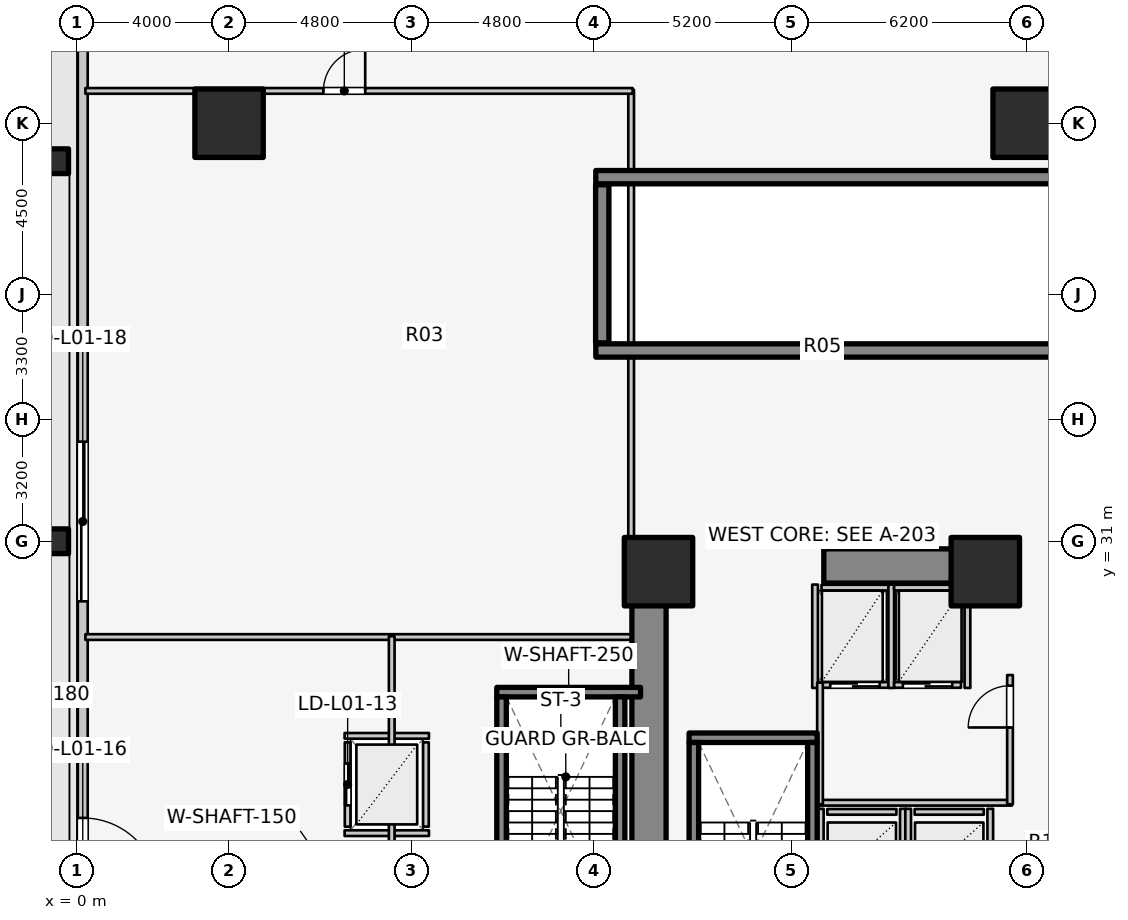
"""IFC4 building model, lengths in metres.
Left out: names, types, materials, properties, quantities, classifications, styles, units other than length and angle.
Written with IfcOpenShell. Run it as: python <this file> out.ifc"""

import sys

from ifc_helpers import new_model, si_unit, direction, frame, frame_2d, origin, origin_2d, place, context, subcontext, project, spatial, rectangle, extrude, element, fill, save


model = new_model("IFC4")
c1 = context("Model", 3, precision=1e-05, world=origin(), true_north=direction((0.0, 1.0)))
c2 = subcontext(c1, "Body", "Model", "MODEL_VIEW")
j1 = project(units=[si_unit("LENGTHUNIT", "METRE"), si_unit("PLANEANGLEUNIT", "RADIAN")], contexts=[c1])
p1 = place(None, origin())
s1 = spatial("IfcSite", under=j1, at=p1, CompositionType="ELEMENT")
p2 = place(p1, origin())
s2 = spatial("IfcBuilding", under=s1, at=p2, CompositionType="ELEMENT")
p3 = place(p2, origin())
s3 = spatial("IfcBuildingStorey", under=s2, at=p3, CompositionType="ELEMENT", Elevation=0.0)
p4 = place(p3, frame((15.05, 17.05, 0.0), z_axis=(0.0, 0.0, 1.0), x_axis=(0.0, 1.0, 0.0)))
e1 = element("IfcWall", 1, at=p4, inside=s3, PredefinedType="SHEAR", context=c2, shape_type="SweptSolid", body=[
    extrude(rectangle(XDim=12.8, YDim=0.9, at=frame_2d((6.4, 0.0))), origin(), (0.0, 0.0, 1.0), 4.6),
])
p5 = place(p3, frame((19.65, 30.35, 0.0), z_axis=(0.0, 0.0, 1.0), x_axis=(1.0, 0.0, 0.0)))
e2 = element("IfcWall", 2, at=p5, inside=s3, PredefinedType="SHEAR", context=c2, shape_type="SweptSolid", body=[
    extrude(rectangle(XDim=4.5, YDim=0.9, at=frame_2d((2.25, 0.0))), origin(), (0.0, 0.0, 1.0), 4.6),
])
p6 = place(p3, frame((16.105, 25.83, 0.0), z_axis=(0.0, 0.0, 1.0), x_axis=(1.0, 0.0, 0.0)))
e3 = element("IfcWall", 3, at=p6, inside=s3, PredefinedType="SOLIDWALL", context=c2, shape_type="SweptSolid", body=[
    extrude(rectangle(XDim=3.37, YDim=0.25, at=frame_2d((1.685, 0.0))), origin(), (0.0, 0.0, 1.0), 4.6),
])
for number, where, z_axis, x_axis in (
    (4, (16.23, 17.895, 0.0), (0.0, 0.0, 1.0), (0.0, 1.0, 0.0)),
    (5, (19.35, 17.895, 0.0), (0.0, 0.0, 1.0), (0.0, 1.0, 0.0)),
):
    element("IfcWall", number, at=place(p3, frame(where, z_axis=z_axis, x_axis=x_axis)), inside=s3, PredefinedType="SOLIDWALL", context=c2, shape_type="SweptSolid", body=[
        extrude(rectangle(XDim=7.81, YDim=0.25, at=frame_2d((3.905, 0.0))), origin(), (0.0, 0.0, 1.0), 4.6),
    ])
p7 = place(p3, frame((11.045, 27.03, 0.0), z_axis=(0.0, 0.0, 1.0), x_axis=(1.0, 0.0, 0.0)))
e6 = element("IfcWall", 6, at=p7, inside=s3, PredefinedType="SOLIDWALL", context=c2, shape_type="SweptSolid", body=[
    extrude(rectangle(XDim=3.782, YDim=0.25, at=frame_2d((1.891, 0.0))), origin(), (0.0, 0.0, 1.0), 4.6),
])
for number, where, z_axis, x_axis in (
    (7, (11.17, 19.095, 0.0), (0.0, 0.0, 1.0), (0.0, 1.0, 0.0)),
    (8, (14.29, 19.095, 0.0), (0.0, 0.0, 1.0), (0.0, 1.0, 0.0)),
):
    element("IfcWall", number, at=place(p3, frame(where, z_axis=z_axis, x_axis=x_axis)), inside=s3, PredefinedType="SOLIDWALL", context=c2, shape_type="SweptSolid", body=[
        extrude(rectangle(XDim=7.81, YDim=0.25, at=frame_2d((3.905, 0.0))), origin(), (0.0, 0.0, 1.0), 4.6),
    ])
for number, where, z_axis, x_axis in (
    (9, (13.65, 36.02, 0.0), (0.0, 0.0, 1.0), (1.0, 0.0, 0.0)),
    (10, (13.65, 40.58, 0.0), (0.0, 0.0, 1.0), (1.0, 0.0, 0.0)),
):
    element("IfcWall", number, at=place(p3, frame(where, z_axis=z_axis, x_axis=x_axis)), inside=s3, PredefinedType="SOLIDWALL", context=c2, shape_type="SweptSolid", body=[
        extrude(rectangle(XDim=44.53, YDim=0.35, at=frame_2d((22.265, 0.0))), origin(), (0.0, 0.0, 1.0), 4.6),
    ])
p8 = place(p3, frame((13.82, 36.22, 0.0), z_axis=(0.0, 0.0, 1.0), x_axis=(0.0, 1.0, 0.0)))
e11 = element("IfcWall", 11, at=p8, inside=s3, PredefinedType="SOLIDWALL", context=c2, shape_type="SweptSolid", body=[
    extrude(rectangle(XDim=4.16, YDim=0.35, at=frame_2d((2.08, 0.0))), origin(), (0.0, 0.0, 1.0), 4.6),
])
for number, where, z_axis, x_axis in (
    (12, (-0.55, 31.0, 0.0), (0.0, 0.0, 1.0), (1.0, 0.0, 0.0)),
    (13, (-0.55, 41.0, 0.0), (0.0, 0.0, 1.0), (1.0, 0.0, 0.0)),
):
    element("IfcColumn", number, at=place(p3, frame(where, z_axis=z_axis, x_axis=x_axis)), inside=s3, PredefinedType="PILASTER", context=c2, shape_type="SweptSolid", body=[
        extrude(rectangle(XDim=0.65, YDim=0.65, at=origin_2d()), origin(), (0.0, 0.0, 1.0), 4.04),
    ])
for number, where, z_axis, x_axis in (
    (14, (23.9, 30.2, 0.0), (0.0, 0.0, 1.0), (1.0, 0.0, 0.0)),
    (15, (15.3, 30.2, 0.0), (0.0, 0.0, 1.0), (1.0, 0.0, 0.0)),
    (16, (25.0, 42.0, 0.0), (0.0, 0.0, 1.0), (1.0, 0.0, 0.0)),
    (17, (4.0, 42.0, 0.0), (0.0, 0.0, 1.0), (1.0, 0.0, 0.0)),
):
    element("IfcColumn", number, at=place(p3, frame(where, z_axis=z_axis, x_axis=x_axis)), inside=s3, PredefinedType="COLUMN", context=c2, shape_type="SweptSolid", body=[
        extrude(rectangle(XDim=1.8, YDim=1.8, at=origin_2d()), origin(), (0.0, 0.0, 1.0), 4.6),
    ])
p9 = place(p3, frame((0.15, 45.72, 0.0), z_axis=(0.0, 0.0, 1.0), x_axis=(0.0, -1.0, 0.0)))
e18 = element("IfcWall", 18, at=p9, inside=s3, PredefinedType="STANDARD", context=c2, shape_type="SweptSolid", body=[
    extrude(rectangle(XDim=45.44, YDim=0.26, at=frame_2d((22.72, 0.0))), origin(), (0.0, 0.0, 1.0), 4.28),
])
p10 = place(p9, frame((29.8, 0.0, 0.0)))
e19 = element("IfcOpeningElement", 19, at=p10, cuts=e18, PredefinedType="OPENING", context=c2, shape_type="SweptSolid", body=[
    extrude(rectangle(XDim=2.0, YDim=2.4, at=frame_2d((1.0, 1.2))), frame((0.0, 0.14, 0.0), z_axis=(0.0, -1.0, 0.0), x_axis=(1.0, 0.0, 0.0)), (0.0, 0.0, 1.0), 0.28),
])
p11 = place(p9, frame((22.0, 0.0, 0.0)))
e20 = element("IfcOpeningElement", 20, at=p11, cuts=e18, PredefinedType="OPENING", context=c2, shape_type="SweptSolid", body=[
    extrude(rectangle(XDim=2.0, YDim=2.4, at=frame_2d((1.0, 1.2))), frame((0.0, 0.14, 0.0), z_axis=(0.0, -1.0, 0.0), x_axis=(1.0, 0.0, 0.0)), (0.0, 0.0, 1.0), 0.28),
])
p12 = place(p9, frame((36.5, 0.0, 0.0)))
e21 = element("IfcOpeningElement", 21, at=p12, cuts=e18, PredefinedType="OPENING", context=c2, shape_type="SweptSolid", body=[
    extrude(rectangle(XDim=2.0, YDim=2.4, at=frame_2d((1.0, 1.2))), frame((0.0, 0.14, 0.0), z_axis=(0.0, -1.0, 0.0), x_axis=(1.0, 0.0, 0.0)), (0.0, 0.0, 1.0), 0.28),
])
p13 = place(p9, frame((12.1, 0.0, 0.0)))
e22 = element("IfcOpeningElement", 22, at=p13, cuts=e18, PredefinedType="OPENING", context=c2, shape_type="SweptSolid", body=[
    extrude(rectangle(XDim=4.2, YDim=3.0, at=frame_2d((2.1, 1.5))), frame((0.0, 0.14, 0.0), z_axis=(0.0, -1.0, 0.0), x_axis=(1.0, 0.0, 0.0)), (0.0, 0.0, 1.0), 0.28),
])
p14 = place(p3, frame((19.74, 23.88, 0.0), z_axis=(0.0, 0.0, 1.0), x_axis=(1.0, 0.0, 0.0)))
e23 = element("IfcWall", 23, at=p14, inside=s3, PredefinedType="SOLIDWALL", context=c2, shape_type="SweptSolid", body=[
    extrude(rectangle(XDim=1.82, YDim=0.15, at=frame_2d((0.91, 0.0))), origin(), (0.0, 0.0, 1.0), 4.255),
])
for number, where, z_axis, x_axis in (
    (24, (19.57, 21.64, 0.0), (0.0, 0.0, 1.0), (0.0, 1.0, 0.0)),
    (25, (21.73, 21.64, 0.0), (0.0, 0.0, 1.0), (0.0, 1.0, 0.0)),
):
    element("IfcWall", number, at=place(p3, frame(where, z_axis=z_axis, x_axis=x_axis)), inside=s3, PredefinedType="SOLIDWALL", context=c2, shape_type="SweptSolid", body=[
        extrude(rectangle(XDim=2.32, YDim=0.15, at=frame_2d((1.16, 0.0))), origin(), (0.0, 0.0, 1.0), 4.255),
    ])
p15 = place(p3, frame((22.04, 23.88, 0.0), z_axis=(0.0, 0.0, 1.0), x_axis=(1.0, 0.0, 0.0)))
e26 = element("IfcWall", 26, at=p15, inside=s3, PredefinedType="SOLIDWALL", context=c2, shape_type="SweptSolid", body=[
    extrude(rectangle(XDim=1.82, YDim=0.15, at=frame_2d((0.91, 0.0))), origin(), (0.0, 0.0, 1.0), 3.62),
])
p16 = place(p3, frame((21.87, 21.64, 0.0), z_axis=(0.0, 0.0, 1.0), x_axis=(0.0, 1.0, 0.0)))
e27 = element("IfcWall", 27, at=p16, inside=s3, PredefinedType="SOLIDWALL", context=c2, shape_type="SweptSolid", body=[
    extrude(rectangle(XDim=2.32, YDim=0.15, at=frame_2d((1.16, 0.0))), origin(), (0.0, 0.0, 1.0), 4.255),
])
p17 = place(p3, frame((24.03, 21.64, 0.0), z_axis=(0.0, 0.0, 1.0), x_axis=(0.0, 1.0, 0.0)))
e28 = element("IfcWall", 28, at=p17, inside=s3, PredefinedType="SOLIDWALL", context=c2, shape_type="SweptSolid", body=[
    extrude(rectangle(XDim=2.32, YDim=0.15, at=frame_2d((1.16, 0.0))), origin(), (0.0, 0.0, 1.0), 3.62),
])
p18 = place(p3, frame((19.59, 27.22, 0.0), z_axis=(0.0, 0.0, 1.0), x_axis=(1.0, 0.0, 0.0)))
e29 = element("IfcWall", 29, at=p18, inside=s3, PredefinedType="SOLIDWALL", context=c2, shape_type="SweptSolid", body=[
    extrude(rectangle(XDim=1.76, YDim=0.15, at=frame_2d((0.88, 0.0))), origin(), (0.0, 0.0, 1.0), 4.255),
])
p19 = place(p18, frame((0.23, 0.0, 0.0)))
e30 = element("IfcOpeningElement", 30, at=p19, cuts=e29, PredefinedType="OPENING", context=c2, shape_type="SweptSolid", body=[
    extrude(rectangle(XDim=1.3, YDim=2.1, at=frame_2d((0.65, 1.05))), frame((0.0, 0.085, 0.0), z_axis=(0.0, -1.0, 0.0), x_axis=(1.0, 0.0, 0.0)), (0.0, 0.0, 1.0), 0.17),
])
p20 = place(p3, frame((19.59, 29.78, 0.0), z_axis=(0.0, 0.0, 1.0), x_axis=(1.0, 0.0, 0.0)))
e31 = element("IfcWall", 31, at=p20, inside=s3, PredefinedType="SOLIDWALL", context=c2, shape_type="SweptSolid", body=[
    extrude(rectangle(XDim=1.76, YDim=0.15, at=frame_2d((0.88, 0.0))), origin(), (0.0, 0.0, 1.0), 4.255),
])
for number, where, z_axis, x_axis in (
    (32, (19.42, 27.14, 0.0), (0.0, 0.0, 1.0), (0.0, 1.0, 0.0)),
    (33, (21.425, 27.14, 0.0), (0.0, 0.0, 1.0), (0.0, 1.0, 0.0)),
):
    element("IfcWall", number, at=place(p3, frame(where, z_axis=z_axis, x_axis=x_axis)), inside=s3, PredefinedType="SOLIDWALL", context=c2, shape_type="SweptSolid", body=[
        extrude(rectangle(XDim=2.72, YDim=0.15, at=frame_2d((1.36, 0.0))), origin(), (0.0, 0.0, 1.0), 4.255),
    ])
p21 = place(p3, frame((21.5, 27.22, 0.0), z_axis=(0.0, 0.0, 1.0), x_axis=(1.0, 0.0, 0.0)))
e34 = element("IfcWall", 34, at=p21, inside=s3, PredefinedType="SOLIDWALL", context=c2, shape_type="SweptSolid", body=[
    extrude(rectangle(XDim=1.76, YDim=0.15, at=frame_2d((0.88, 0.0))), origin(), (0.0, 0.0, 1.0), 4.255),
])
p22 = place(p21, frame((0.23, 0.0, 0.0)))
e35 = element("IfcOpeningElement", 35, at=p22, cuts=e34, PredefinedType="OPENING", context=c2, shape_type="SweptSolid", body=[
    extrude(rectangle(XDim=1.3, YDim=2.1, at=frame_2d((0.65, 1.05))), frame((0.0, 0.085, 0.0), z_axis=(0.0, -1.0, 0.0), x_axis=(1.0, 0.0, 0.0)), (0.0, 0.0, 1.0), 0.17),
])
p23 = place(p3, frame((21.5, 29.78, 0.0), z_axis=(0.0, 0.0, 1.0), x_axis=(1.0, 0.0, 0.0)))
e36 = element("IfcWall", 36, at=p23, inside=s3, PredefinedType="SOLIDWALL", context=c2, shape_type="SweptSolid", body=[
    extrude(rectangle(XDim=1.76, YDim=0.15, at=frame_2d((0.88, 0.0))), origin(), (0.0, 0.0, 1.0), 4.255),
])
p24 = place(p3, frame((23.43, 27.14, 0.0), z_axis=(0.0, 0.0, 1.0), x_axis=(0.0, 1.0, 0.0)))
e37 = element("IfcWall", 37, at=p24, inside=s3, PredefinedType="SOLIDWALL", context=c2, shape_type="SweptSolid", body=[
    extrude(rectangle(XDim=2.72, YDim=0.15, at=frame_2d((1.36, 0.0))), origin(), (0.0, 0.0, 1.0), 4.255),
])
p25 = place(p3, frame((7.12, 23.49, 0.0), z_axis=(0.0, 0.0, 1.0), x_axis=(0.0, 1.0, 0.0)))
e38 = element("IfcWall", 38, at=p25, inside=s3, PredefinedType="SOLIDWALL", context=c2, shape_type="SweptSolid", body=[
    extrude(rectangle(XDim=2.22, YDim=0.15, at=frame_2d((1.11, 0.0))), origin(), (0.0, 0.0, 1.0), 4.255),
])
p26 = place(p25, frame((0.56, 0.0, 0.0)))
e39 = element("IfcOpeningElement", 39, at=p26, cuts=e38, PredefinedType="OPENING", context=c2, shape_type="SweptSolid", body=[
    extrude(rectangle(XDim=1.1, YDim=2.1, at=frame_2d((0.55, 1.05))), frame((0.0, 0.085, 0.0), z_axis=(0.0, -1.0, 0.0), x_axis=(1.0, 0.0, 0.0)), (0.0, 0.0, 1.0), 0.17),
])
for number, where, z_axis, x_axis in (
    (40, (9.18, 23.49, 0.0), (0.0, 0.0, 1.0), (0.0, 1.0, 0.0)),
    (41, (7.04, 23.32, 0.0), (0.0, 0.0, 1.0), (1.0, 0.0, 0.0)),
    (42, (7.04, 25.88, 0.0), (0.0, 0.0, 1.0), (1.0, 0.0, 0.0)),
):
    element("IfcWall", number, at=place(p3, frame(where, z_axis=z_axis, x_axis=x_axis)), inside=s3, PredefinedType="SOLIDWALL", context=c2, shape_type="SweptSolid", body=[
        extrude(rectangle(XDim=2.22, YDim=0.15, at=frame_2d((1.11, 0.0))), origin(), (0.0, 0.0, 1.0), 4.255),
    ])
p27 = place(p3, frame((19.52, 24.12, 0.0), z_axis=(0.0, 0.0, 1.0), x_axis=(1.0, 0.0, 0.0)))
e43 = element("IfcWall", 43, at=p27, inside=s3, PredefinedType="PARTITIONING", context=c2, shape_type="SweptSolid", body=[
    extrude(rectangle(XDim=5.08, YDim=0.15, at=frame_2d((2.54, 0.0))), origin(), (0.0, 0.0, 1.0), 3.62),
])
p28 = place(p3, frame((19.55, 24.08, 0.0), z_axis=(0.0, 0.0, 1.0), x_axis=(0.0, 1.0, 0.0)))
e44 = element("IfcWall", 44, at=p28, inside=s3, PredefinedType="PARTITIONING", context=c2, shape_type="SweptSolid", body=[
    extrude(rectangle(XDim=3.2, YDim=0.15, at=frame_2d((1.6, 0.0))), origin(), (0.0, 0.0, 1.0), 4.255),
])
p29 = place(p3, frame((24.55, 24.08, 0.0), z_axis=(0.0, 0.0, 1.0), x_axis=(0.0, 1.0, 0.0)))
e45 = element("IfcWall", 45, at=p29, inside=s3, PredefinedType="PARTITIONING", context=c2, shape_type="SweptSolid", body=[
    extrude(rectangle(XDim=3.4, YDim=0.15, at=frame_2d((1.7, 0.0))), origin(), (0.0, 0.0, 1.0), 4.255),
])
p30 = place(p29, frame((2.02, 0.0, 0.0)))
e46 = element("IfcOpeningElement", 46, at=p30, cuts=e45, PredefinedType="OPENING", context=c2, shape_type="SweptSolid", body=[
    extrude(rectangle(XDim=1.1, YDim=2.1, at=frame_2d((0.55, 1.05))), frame((0.0, 0.085, 0.0), z_axis=(0.0, -1.0, 0.0), x_axis=(1.0, 0.0, 0.0)), (0.0, 0.0, 1.0), 0.17),
])
p31 = place(p3, frame((0.22, 28.48, 0.0), z_axis=(0.0, 0.0, 1.0), x_axis=(1.0, 0.0, 0.0)))
e47 = element("IfcWall", 47, at=p31, inside=s3, PredefinedType="PARTITIONING", context=c2, shape_type="SweptSolid", body=[
    extrude(rectangle(XDim=14.4, YDim=0.15, at=frame_2d((7.2, 0.0))), origin(), (0.0, 0.0, 1.0), 3.3),
])
p32 = place(p3, frame((8.28, 16.3, 0.0), z_axis=(0.0, 0.0, 1.0), x_axis=(0.0, 1.0, 0.0)))
e48 = element("IfcWall", 48, at=p32, inside=s3, PredefinedType="PARTITIONING", context=c2, shape_type="SweptSolid", body=[
    extrude(rectangle(XDim=12.2, YDim=0.15, at=frame_2d((6.1, 0.0))), origin(), (0.0, 0.0, 1.0), 4.255),
])
p33 = place(p3, frame((14.58, 29.86, 0.0), z_axis=(0.0, 0.0, 1.0), x_axis=(0.0, 1.0, 0.0)))
e49 = element("IfcWall", 49, at=p33, inside=s3, PredefinedType="PARTITIONING", context=c2, shape_type="SweptSolid", body=[
    extrude(rectangle(XDim=13.02, YDim=0.15, at=frame_2d((6.51, 0.0))), origin(), (0.0, 0.0, 1.0), 3.3),
])
p34 = place(p3, frame((0.22, 42.85, 0.0), z_axis=(0.0, 0.0, 1.0), x_axis=(1.0, 0.0, 0.0)))
e50 = element("IfcWall", 50, at=p34, inside=s3, PredefinedType="PARTITIONING", context=c2, shape_type="SweptSolid", body=[
    extrude(rectangle(XDim=14.4, YDim=0.15, at=frame_2d((7.2, 0.0))), origin(), (0.0, 0.0, 1.0), 4.255),
])
p35 = place(p34, frame((6.262, 0.0, 0.0)))
e51 = element("IfcOpeningElement", 51, at=p35, cuts=e50, PredefinedType="OPENING", context=c2, shape_type="SweptSolid", body=[
    extrude(rectangle(XDim=1.1, YDim=2.1, at=frame_2d((0.55, 1.05))), frame((0.0, 0.085, 0.0), z_axis=(0.0, -1.0, 0.0), x_axis=(1.0, 0.0, 0.0)), (0.0, 0.0, 1.0), 0.17),
])
p36 = place(p11, frame((2.0, 0.0, 0.0), z_axis=(0.0, 0.0, 1.0), x_axis=(-1.0, 0.0, 0.0)))
e52 = element("IfcDoor", 52, at=p36, inside=s3, OperationType="SINGLE_SWING_RIGHT", PredefinedType="DOOR", context=c2, shape_type="SweptSolid", body=[
    extrude(rectangle(XDim=2.0, YDim=2.4, at=frame_2d((1.0, 1.2))), frame((0.0, 0.025, 0.0), z_axis=(0.0, -1.0, 0.0), x_axis=(1.0, 0.0, 0.0)), (0.0, 0.0, 1.0), 0.05),
])
fill(e20, e52)
p37 = place(p13, origin())
e53 = element("IfcDoor", 53, at=p37, inside=s3, OperationType="SLIDING_TO_LEFT", PredefinedType="GATE", context=c2, shape_type="SweptSolid", body=[
    extrude(rectangle(XDim=4.2, YDim=3.0, at=frame_2d((2.1, 1.5))), frame((0.0, 0.025, 0.0), z_axis=(0.0, -1.0, 0.0), x_axis=(1.0, 0.0, 0.0)), (0.0, 0.0, 1.0), 0.05),
])
fill(e22, e53)
p38 = place(p19, origin())
e54 = element("IfcDoor", 54, at=p38, inside=s3, OperationType="DOUBLE_DOOR_SLIDING", PredefinedType="DOOR", context=c2, shape_type="SweptSolid", body=[
    extrude(rectangle(XDim=1.3, YDim=2.1, at=frame_2d((0.65, 1.05))), frame((0.0, 0.025, 0.0), z_axis=(0.0, -1.0, 0.0), x_axis=(1.0, 0.0, 0.0)), (0.0, 0.0, 1.0), 0.05),
])
fill(e30, e54)
p39 = place(p22, origin())
e55 = element("IfcDoor", 55, at=p39, inside=s3, OperationType="DOUBLE_DOOR_SLIDING", PredefinedType="DOOR", context=c2, shape_type="SweptSolid", body=[
    extrude(rectangle(XDim=1.3, YDim=2.1, at=frame_2d((0.65, 1.05))), frame((0.0, 0.025, 0.0), z_axis=(0.0, -1.0, 0.0), x_axis=(1.0, 0.0, 0.0)), (0.0, 0.0, 1.0), 0.05),
])
fill(e35, e55)
p40 = place(p26, origin())
e56 = element("IfcDoor", 56, at=p40, inside=s3, OperationType="DOUBLE_DOOR_SLIDING", PredefinedType="DOOR", context=c2, shape_type="SweptSolid", body=[
    extrude(rectangle(XDim=1.1, YDim=2.1, at=frame_2d((0.55, 1.05))), frame((0.0, 0.025, 0.0), z_axis=(0.0, -1.0, 0.0), x_axis=(1.0, 0.0, 0.0)), (0.0, 0.0, 1.0), 0.05),
])
fill(e39, e56)
p41 = place(p30, origin())
e57 = element("IfcDoor", 57, at=p41, inside=s3, OperationType="SINGLE_SWING_LEFT", PredefinedType="DOOR", context=c2, shape_type="SweptSolid", body=[
    extrude(rectangle(XDim=1.1, YDim=2.1, at=frame_2d((0.55, 1.05))), frame((0.0, 0.025, 0.0), z_axis=(0.0, -1.0, 0.0), x_axis=(1.0, 0.0, 0.0)), (0.0, 0.0, 1.0), 0.05),
])
fill(e46, e57)
p42 = place(p35, origin())
e58 = element("IfcDoor", 58, at=p42, inside=s3, OperationType="SINGLE_SWING_RIGHT", PredefinedType="DOOR", context=c2, shape_type="SweptSolid", body=[
    extrude(rectangle(XDim=1.1, YDim=2.1, at=frame_2d((0.55, 1.05))), frame((0.0, 0.025, 0.0), z_axis=(0.0, -1.0, 0.0), x_axis=(1.0, 0.0, 0.0)), (0.0, 0.0, 1.0), 0.05),
])
fill(e51, e58)
save(model, sys.argv[1])
